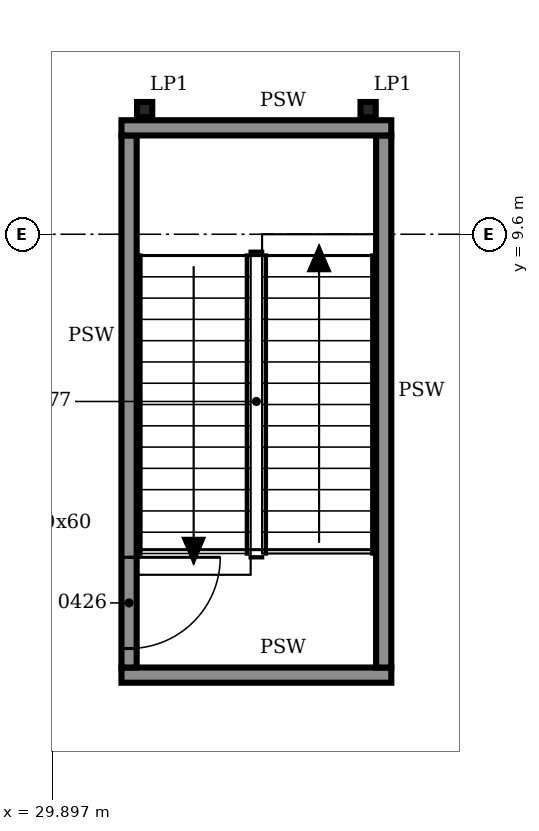
"""IFC4 building model, lengths in metres.
Left out: names, types, materials, properties, quantities, classifications, styles, units other than length and angle.
Written with IfcOpenShell. Run it as: python <this file> out.ifc"""

import sys

from ifc_helpers import new_model, si_unit, direction, frame, frame_2d, origin, origin_2d, place, context, subcontext, project, spatial, rectangle, i_section, extrude, element, fill, save


model = new_model("IFC4")
c1 = context("Model", 3, precision=1e-05, world=origin(), true_north=direction((0.0, 1.0)))
c2 = subcontext(c1, "Body", "Model", "MODEL_VIEW")
j1 = project(units=[si_unit("LENGTHUNIT", "METRE"), si_unit("PLANEANGLEUNIT", "RADIAN")], contexts=[c1])
p1 = place(None, origin())
s1 = spatial("IfcSite", under=j1, at=p1, CompositionType="ELEMENT")
p2 = place(p1, origin())
s2 = spatial("IfcBuilding", under=s1, at=p2, CompositionType="ELEMENT")
p3 = place(p2, frame((0.0, 0.0, 25.8)))
s3 = spatial("IfcBuildingStorey", under=s2, at=p3, CompositionType="ELEMENT", Elevation=25.8)
for number, where, z_axis, x_axis in (
    (1, (31.105, 11.24, 0.0), (0.0, 0.0, 1.0), (1.0, 0.0, 0.0)),
    (2, (34.045, 11.24, 0.0), (0.0, 0.0, 1.0), (1.0, 0.0, 0.0)),
):
    element("IfcColumn", number, at=place(p3, frame(where, z_axis=z_axis, x_axis=x_axis)), inside=s3, PredefinedType="COLUMN", context=c2, shape_type="SweptSolid", body=[
        extrude(i_section(OverallWidth=0.2, OverallDepth=0.2, WebThickness=0.009, FlangeThickness=0.015, FilletRadius=0.018, at=origin_2d()), origin(), (0.0, 0.0, 1.0), 4.8),
    ])
p4 = place(p3, frame((30.8, 3.8, 0.0), z_axis=(0.0, 0.0, 1.0), x_axis=(1.0, 0.0, 0.0)))
e3 = element("IfcWall", 3, at=p4, inside=s3, PredefinedType="SOLIDWALL", context=c2, shape_type="SweptSolid", body=[
    extrude(rectangle(XDim=3.55, YDim=0.2, at=frame_2d((1.775, 0.0))), origin(), (0.0, 0.0, 1.0), 4.6),
])
p5 = place(p3, frame((30.9, 3.9, 0.0), z_axis=(0.0, 0.0, 1.0), x_axis=(0.0, 1.0, 0.0)))
e4 = element("IfcWall", 4, at=p5, inside=s3, PredefinedType="SOLIDWALL", context=c2, shape_type="SweptSolid", body=[
    extrude(rectangle(XDim=7.0, YDim=0.2, at=frame_2d((3.5, 0.0))), origin(), (0.0, 0.0, 1.0), 4.6),
])
p6 = place(p5, frame((0.25, 0.0, 0.0)))
e5 = element("IfcOpeningElement", 5, at=p6, cuts=e4, PredefinedType="OPENING", context=c2, shape_type="SweptSolid", body=[
    extrude(rectangle(XDim=1.2, YDim=2.1, at=frame_2d((0.6, 1.05))), frame((0.0, 0.11, 0.0), z_axis=(0.0, -1.0, 0.0), x_axis=(1.0, 0.0, 0.0)), (0.0, 0.0, 1.0), 0.22),
])
p7 = place(p3, frame((34.25, 3.9, 0.0), z_axis=(0.0, 0.0, 1.0), x_axis=(0.0, 1.0, 0.0)))
e6 = element("IfcWall", 6, at=p7, inside=s3, PredefinedType="SOLIDWALL", context=c2, shape_type="SweptSolid", body=[
    extrude(rectangle(XDim=7.0, YDim=0.2, at=frame_2d((3.5, 0.0))), origin(), (0.0, 0.0, 1.0), 4.6),
])
p8 = place(p3, frame((30.8, 11.0, 0.0), z_axis=(0.0, 0.0, 1.0), x_axis=(1.0, 0.0, 0.0)))
e7 = element("IfcWall", 7, at=p8, inside=s3, PredefinedType="SOLIDWALL", context=c2, shape_type="SweptSolid", body=[
    extrude(rectangle(XDim=3.55, YDim=0.2, at=frame_2d((1.775, 0.0))), origin(), (0.0, 0.0, 1.0), 4.6),
])
p9 = place(p6, frame((1.2, 0.0, 0.0), z_axis=(0.0, 0.0, 1.0), x_axis=(-1.0, 0.0, 0.0)))
e8 = element("IfcDoor", 8, at=p9, inside=s3, OperationType="SINGLE_SWING_LEFT", PredefinedType="DOOR", context=c2, shape_type="SweptSolid", body=[
    extrude(rectangle(XDim=1.2, YDim=2.1, at=frame_2d((0.6, 1.05))), frame((0.0, 0.025, 0.0), z_axis=(0.0, -1.0, 0.0), x_axis=(1.0, 0.0, 0.0)), (0.0, 0.0, 1.0), 0.05),
])
fill(e5, e8)
save(model, sys.argv[1])
